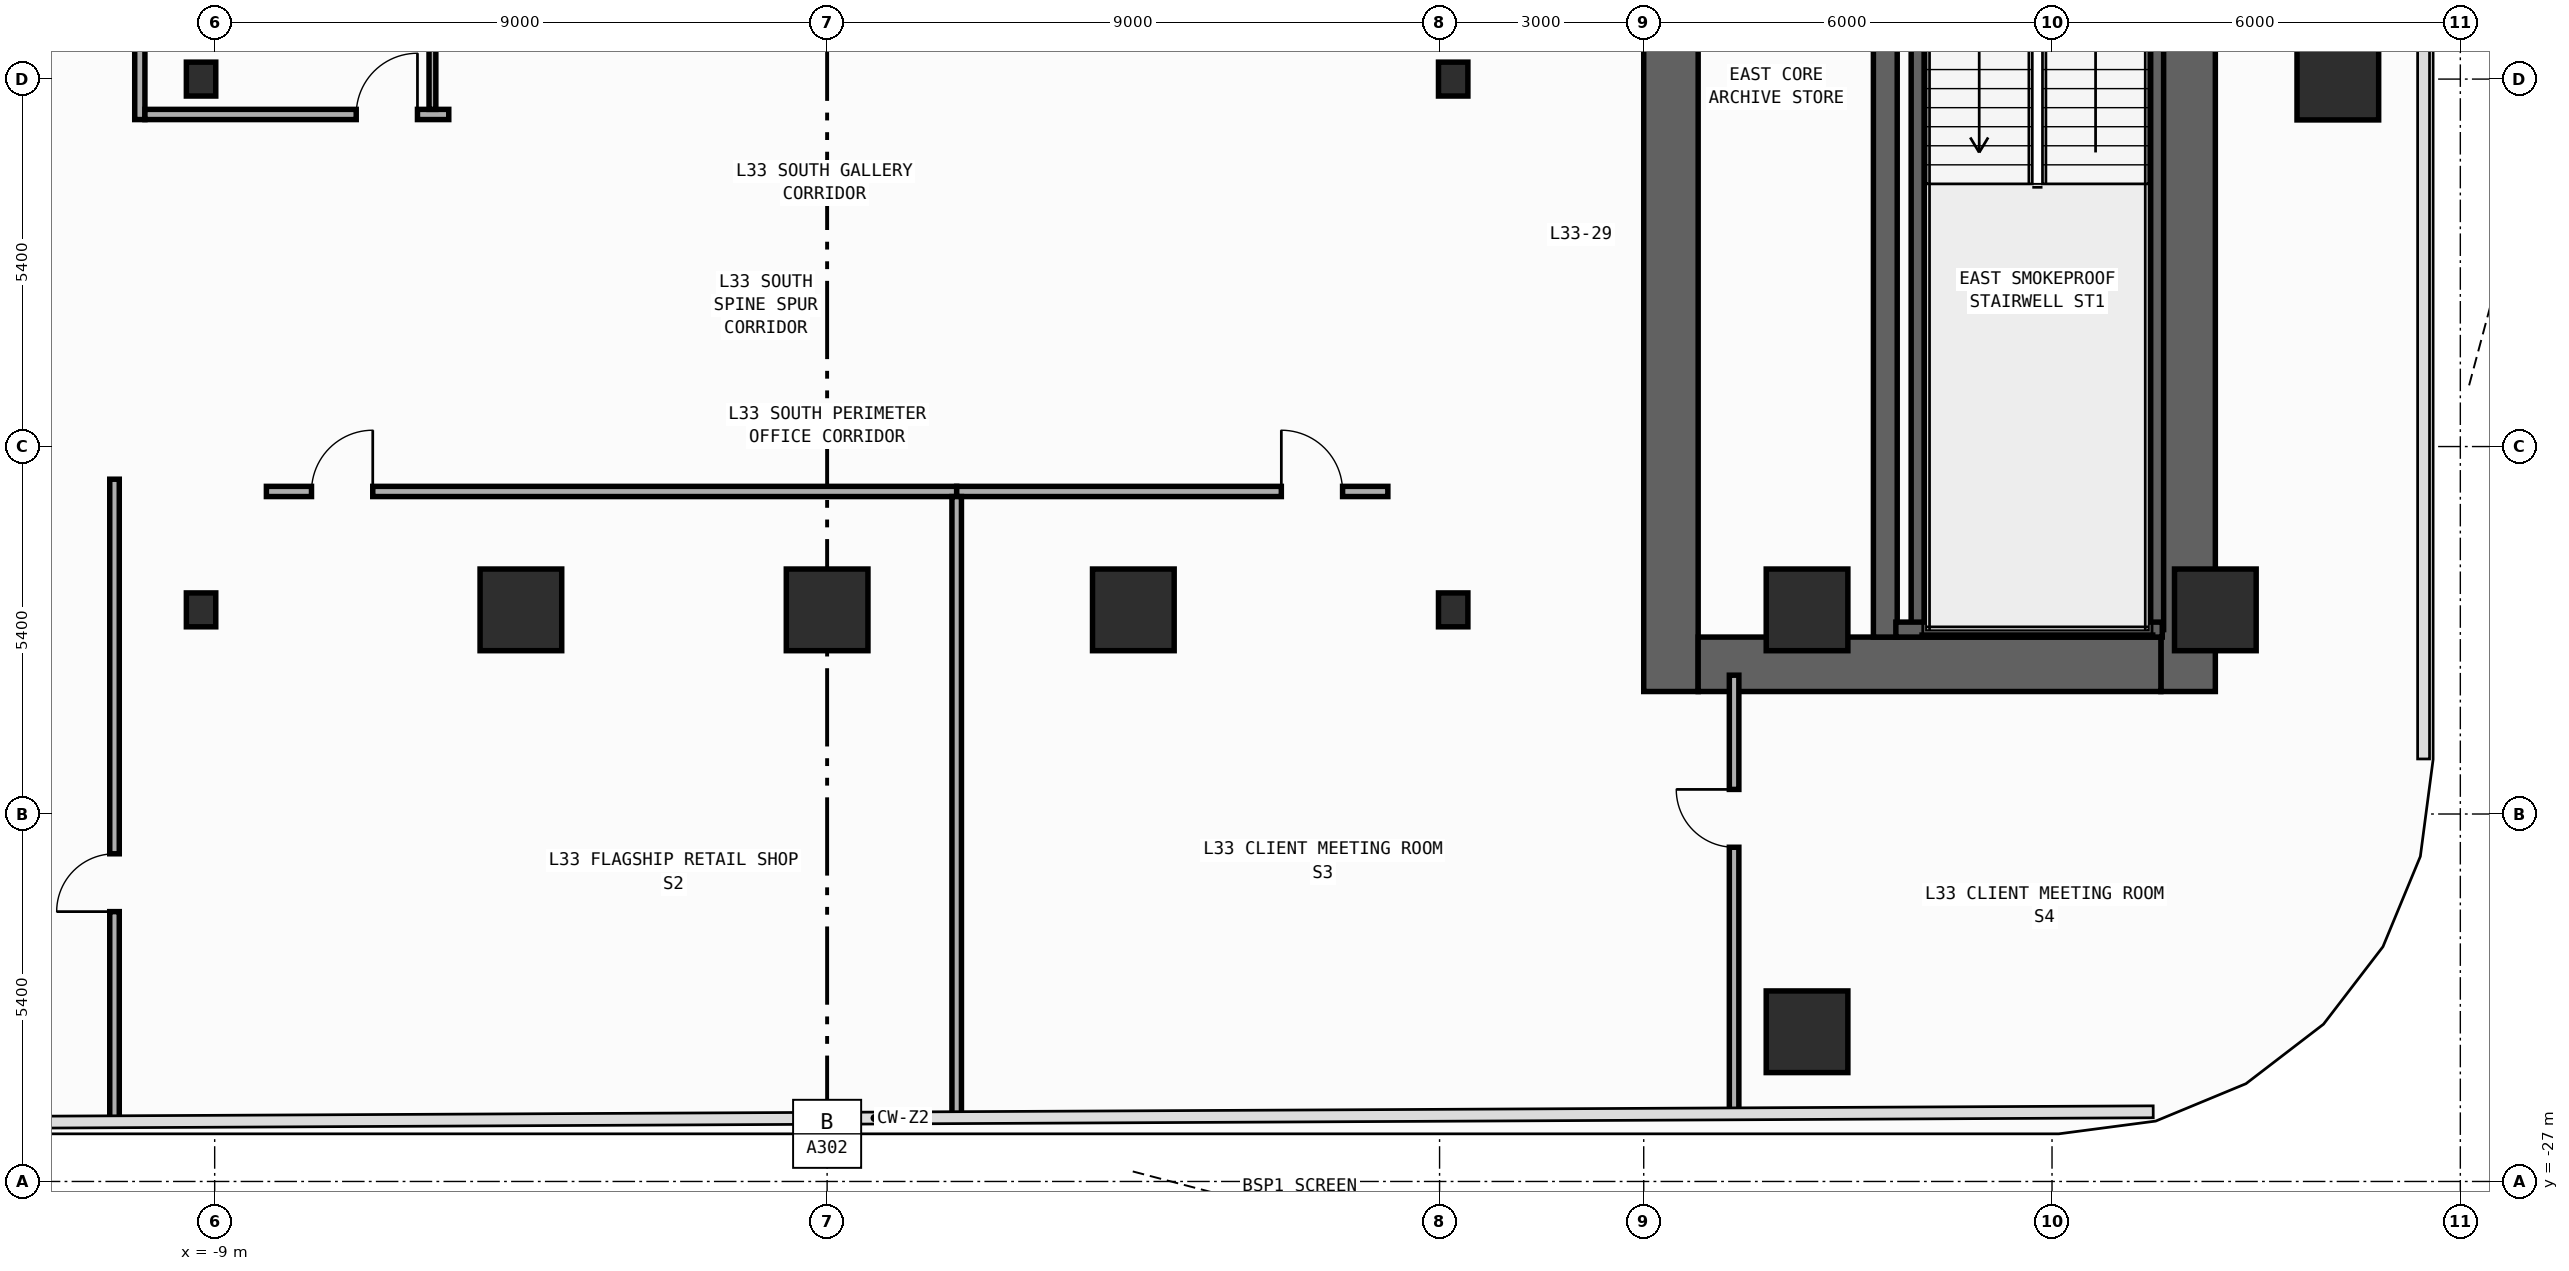
"""IFC4 building model, lengths in metres.
Left out: names, types, materials, properties, quantities, classifications, styles, units other than length and angle.
Written with IfcOpenShell. Run it as: python <this file> out.ifc"""

import sys

from ifc_helpers import new_model, si_unit, direction, frame, frame_2d, origin, origin_2d, place, context, subcontext, project, spatial, rectangle, i_section, extrude, element, fill, save


model = new_model("IFC4")
c1 = context("Model", 3, precision=1e-05, world=origin(), true_north=direction((0.0, 1.0)))
c2 = subcontext(c1, "Body", "Model", "MODEL_VIEW")
j1 = project(units=[si_unit("LENGTHUNIT", "METRE"), si_unit("PLANEANGLEUNIT", "RADIAN")], contexts=[c1])
p1 = place(None, origin())
s1 = spatial("IfcSite", under=j1, at=p1, CompositionType="ELEMENT")
p2 = place(p1, origin())
s2 = spatial("IfcBuilding", under=s1, at=p2, CompositionType="ELEMENT")
p3 = place(p2, frame((0.0, 0.0, 143.6)))
s3 = spatial("IfcBuildingStorey", under=s2, at=p3, CompositionType="ELEMENT", Elevation=143.6)
p4 = place(p3, frame((12.4, -19.8, 0.0), z_axis=(0.0, 0.0, 1.0), x_axis=(0.0, 1.0, 0.0)))
e1 = element("IfcWall", 1, at=p4, inside=s3, PredefinedType="SHEAR", context=c2, shape_type="SweptSolid", body=[
    extrude(rectangle(XDim=27.0, YDim=0.8, at=frame_2d((13.5, 0.0))), origin(), (0.0, 0.0, 1.0), 3.94),
])
p5 = place(p4, frame((23.05, 0.0, 0.0)))
e2 = element("IfcOpeningElement", 2, at=p5, cuts=e1, PredefinedType="OPENING", context=c2, shape_type="SweptSolid", body=[
    extrude(rectangle(XDim=1.1, YDim=2.2, at=frame_2d((0.55, 1.1))), frame((0.0, 0.41, 0.0), z_axis=(0.0, -1.0, 0.0), x_axis=(1.0, 0.0, 0.0)), (0.0, 0.0, 1.0), 0.82),
])
p6 = place(p4, frame((19.85, 0.0, 0.0)))
e3 = element("IfcOpeningElement", 3, at=p6, cuts=e1, PredefinedType="OPENING", context=c2, shape_type="SweptSolid", body=[
    extrude(rectangle(XDim=1.1, YDim=2.2, at=frame_2d((0.55, 1.1))), frame((0.0, 0.41, 0.0), z_axis=(0.0, -1.0, 0.0), x_axis=(1.0, 0.0, 0.0)), (0.0, 0.0, 1.0), 0.82),
])
p7 = place(p4, frame((16.65, 0.0, 0.0)))
e4 = element("IfcOpeningElement", 4, at=p7, cuts=e1, PredefinedType="OPENING", context=c2, shape_type="SweptSolid", body=[
    extrude(rectangle(XDim=1.1, YDim=2.2, at=frame_2d((0.55, 1.1))), frame((0.0, 0.41, 0.0), z_axis=(0.0, -1.0, 0.0), x_axis=(1.0, 0.0, 0.0)), (0.0, 0.0, 1.0), 0.82),
])
p8 = place(p4, frame((10.175, 0.0, 0.0)))
e5 = element("IfcOpeningElement", 5, at=p8, cuts=e1, PredefinedType="OPENING", context=c2, shape_type="SweptSolid", body=[
    extrude(rectangle(XDim=0.85, YDim=2.1, at=frame_2d((0.425, 1.05))), frame((0.0, 0.41, 0.0), z_axis=(0.0, -1.0, 0.0), x_axis=(1.0, 0.0, 0.0)), (0.0, 0.0, 1.0), 0.82),
])
p9 = place(p4, frame((12.725, 0.0, 0.0)))
e6 = element("IfcOpeningElement", 6, at=p9, cuts=e1, PredefinedType="OPENING", context=c2, shape_type="SweptSolid", body=[
    extrude(rectangle(XDim=1.15, YDim=2.2, at=frame_2d((0.575, 1.1))), frame((0.0, 0.41, 0.0), z_axis=(0.0, -1.0, 0.0), x_axis=(1.0, 0.0, 0.0)), (0.0, 0.0, 1.0), 0.82),
])
p10 = place(p4, frame((25.125, 0.0, 0.0)))
e7 = element("IfcOpeningElement", 7, at=p10, cuts=e1, PredefinedType="OPENING", context=c2, shape_type="SweptSolid", body=[
    extrude(rectangle(XDim=0.85, YDim=2.1, at=frame_2d((0.425, 1.05))), frame((0.0, 0.41, 0.0), z_axis=(0.0, -1.0, 0.0), x_axis=(1.0, 0.0, 0.0)), (0.0, 0.0, 1.0), 0.82),
])
p11 = place(p3, frame((20.0, -19.8, 0.0), z_axis=(0.0, 0.0, 1.0), x_axis=(0.0, 1.0, 0.0)))
e8 = element("IfcWall", 8, at=p11, inside=s3, PredefinedType="SHEAR", context=c2, shape_type="SweptSolid", body=[
    extrude(rectangle(XDim=27.0, YDim=0.8, at=frame_2d((13.5, 0.0))), origin(), (0.0, 0.0, 1.0), 3.94),
])
p12 = place(p3, frame((12.8, -19.4, 0.0), z_axis=(0.0, 0.0, 1.0), x_axis=(1.0, 0.0, 0.0)))
e9 = element("IfcWall", 9, at=p12, inside=s3, PredefinedType="SHEAR", context=c2, shape_type="SweptSolid", body=[
    extrude(rectangle(XDim=6.8, YDim=0.8, at=frame_2d((3.4, 0.0))), origin(), (0.0, 0.0, 1.0), 3.94),
])
p13 = place(p3, frame((15.55, -19.0, 0.0), z_axis=(0.0, 0.0, 1.0), x_axis=(0.0, 1.0, 0.0)))
e10 = element("IfcWall", 10, at=p13, inside=s3, PredefinedType="SHEAR", context=c2, shape_type="SweptSolid", body=[
    extrude(rectangle(XDim=25.4, YDim=0.35, at=frame_2d((12.7, 0.0))), origin(), (0.0, 0.0, 1.0), 3.94),
])
p14 = place(p13, frame((11.925, 0.0, 0.0)))
e11 = element("IfcOpeningElement", 11, at=p14, cuts=e10, PredefinedType="OPENING", context=c2, shape_type="SweptSolid", body=[
    extrude(rectangle(XDim=1.15, YDim=2.2, at=frame_2d((0.575, 1.1))), frame((0.0, 0.185, 0.0), z_axis=(0.0, -1.0, 0.0), x_axis=(1.0, 0.0, 0.0)), (0.0, 0.0, 1.0), 0.37),
])
p15 = place(p13, frame((24.325, 0.0, 0.0)))
e12 = element("IfcOpeningElement", 12, at=p15, cuts=e10, PredefinedType="OPENING", context=c2, shape_type="SweptSolid", body=[
    extrude(rectangle(XDim=0.85, YDim=2.1, at=frame_2d((0.425, 1.05))), frame((0.0, 0.185, 0.0), z_axis=(0.0, -1.0, 0.0), x_axis=(1.0, 0.0, 0.0)), (0.0, 0.0, 1.0), 0.37),
])
for number, where, z_axis, x_axis in (
    (13, (16.04, -18.89, 0.0), (0.0, 0.0, 1.0), (0.0, 1.0, 0.0)),
    (14, (19.53, -18.89, 0.0), (0.0, 0.0, 1.0), (0.0, 1.0, 0.0)),
):
    element("IfcWall", number, at=place(p3, frame(where, z_axis=z_axis, x_axis=x_axis)), inside=s3, PredefinedType="SHEAR", context=c2, shape_type="SweptSolid", body=[
        extrude(rectangle(XDim=11.3, YDim=0.22, at=frame_2d((5.65, 0.0))), origin(), (0.0, 0.0, 1.0), 3.94),
    ])
p16 = place(p3, frame((15.705, -18.89, 0.0), z_axis=(0.0, 0.0, 1.0), x_axis=(1.0, 0.0, 0.0)))
e15 = element("IfcWall", 15, at=p16, inside=s3, PredefinedType="SHEAR", context=c2, shape_type="SweptSolid", body=[
    extrude(rectangle(XDim=3.915, YDim=0.22, at=frame_2d((1.958, 0.0))), origin(), (0.0, 0.0, 1.0), 3.94),
])
for number, where, z_axis, x_axis in (
    (16, (-9.2, -18.6, 0.0), (0.0, 0.0, 1.0), (1.0, 0.0, 0.0)),
    (17, (-9.2, -10.8, 0.0), (0.0, 0.0, 1.0), (1.0, 0.0, 0.0)),
    (18, (9.2, -18.6, 0.0), (0.0, 0.0, 1.0), (1.0, 0.0, 0.0)),
    (19, (9.2, -10.8, 0.0), (0.0, 0.0, 1.0), (1.0, 0.0, 0.0)),
):
    element("IfcColumn", number, at=place(p3, frame(where, z_axis=z_axis, x_axis=x_axis)), inside=s3, PredefinedType="COLUMN", context=c2, shape_type="SweptSolid", body=[
        extrude(i_section(OverallWidth=0.432, OverallDepth=0.498, WebThickness=0.045, FlangeThickness=0.07, FilletRadius=0.022, at=origin_2d()), origin(), (0.0, 0.0, 1.0), 4.2),
    ])
for number, where, z_axis, x_axis in (
    (20, (20.4, -18.6, 0.0), (0.0, 0.0, 1.0), (1.0, 0.0, 0.0)),
    (21, (14.4, -18.6, 0.0), (0.0, 0.0, 1.0), (1.0, 0.0, 0.0)),
    (22, (-4.5, -18.6, 0.0), (0.0, 0.0, 1.0), (1.0, 0.0, 0.0)),
    (23, (0.0, -18.6, 0.0), (0.0, 0.0, 1.0), (1.0, 0.0, 0.0)),
    (24, (4.5, -18.6, 0.0), (0.0, 0.0, 1.0), (1.0, 0.0, 0.0)),
    (25, (22.2, -10.8, 0.0), (0.0, 0.0, 1.0), (1.0, 0.0, 0.0)),
    (26, (14.4, -24.8, 0.0), (0.0, 0.0, 1.0), (1.0, 0.0, 0.0)),
):
    element("IfcColumn", number, at=place(p3, frame(where, z_axis=z_axis, x_axis=x_axis)), inside=s3, PredefinedType="COLUMN", context=c2, shape_type="SweptSolid", body=[
        extrude(rectangle(XDim=1.2, YDim=1.2, at=origin_2d()), origin(), (0.0, 0.0, 1.0), 4.2),
    ])
p17 = place(p3, frame((-10.1, -11.395, 0.0), z_axis=(0.0, 0.0, 1.0), x_axis=(0.0, 1.0, 0.0)))
e27 = element("IfcWall", 27, at=p17, inside=s3, PredefinedType="PARTITIONING", context=c2, shape_type="SweptSolid", body=[
    extrude(rectangle(XDim=4.275, YDim=0.15, at=frame_2d((2.137, 0.0))), origin(), (0.0, 0.0, 1.0), 3.94),
])
p18 = place(p17, frame((2.915, 0.0, 0.0)))
e28 = element("IfcOpeningElement", 28, at=p18, cuts=e27, PredefinedType="OPENING", context=c2, shape_type="SweptSolid", body=[
    extrude(rectangle(XDim=0.9, YDim=2.15, at=frame_2d((0.45, 1.075))), frame((0.0, 0.085, 0.0), z_axis=(0.0, -1.0, 0.0), x_axis=(1.0, 0.0, 0.0)), (0.0, 0.0, 1.0), 0.17),
])
p19 = place(p3, frame((-10.025, -11.32, 0.0), z_axis=(0.0, 0.0, 1.0), x_axis=(1.0, 0.0, 0.0)))
e29 = element("IfcWall", 29, at=p19, inside=s3, PredefinedType="PARTITIONING", context=c2, shape_type="SweptSolid", body=[
    extrude(rectangle(XDim=4.465, YDim=0.15, at=frame_2d((2.232, 0.0))), origin(), (0.0, 0.0, 1.0), 3.94),
])
p20 = place(p19, frame((3.105, 0.0, 0.0)))
e30 = element("IfcOpeningElement", 30, at=p20, cuts=e29, PredefinedType="OPENING", context=c2, shape_type="SweptSolid", body=[
    extrude(rectangle(XDim=0.9, YDim=2.15, at=frame_2d((0.45, 1.075))), frame((0.0, 0.085, 0.0), z_axis=(0.0, -1.0, 0.0), x_axis=(1.0, 0.0, 0.0)), (0.0, 0.0, 1.0), 0.17),
])
p21 = place(p3, frame((-8.24, -16.86, 0.0), z_axis=(0.0, 0.0, 1.0), x_axis=(1.0, 0.0, 0.0)))
e31 = element("IfcWall", 31, at=p21, inside=s3, PredefinedType="PARTITIONING", context=c2, shape_type="SweptSolid", body=[
    extrude(rectangle(XDim=10.144, YDim=0.15, at=frame_2d((5.072, 0.0))), origin(), (0.0, 0.0, 1.0), 3.94),
])
p22 = place(p21, frame((0.663, 0.0, 0.0)))
e32 = element("IfcOpeningElement", 32, at=p22, cuts=e31, PredefinedType="OPENING", context=c2, shape_type="SweptSolid", body=[
    extrude(rectangle(XDim=0.9, YDim=2.15, at=frame_2d((0.45, 1.075))), frame((0.0, 0.085, 0.0), z_axis=(0.0, -1.0, 0.0), x_axis=(1.0, 0.0, 0.0)), (0.0, 0.0, 1.0), 0.17),
])
p23 = place(p3, frame((1.904, -16.86, 0.0), z_axis=(0.0, 0.0, 1.0), x_axis=(1.0, 0.0, 0.0)))
e33 = element("IfcWall", 33, at=p23, inside=s3, PredefinedType="PARTITIONING", context=c2, shape_type="SweptSolid", body=[
    extrude(rectangle(XDim=6.336, YDim=0.15, at=frame_2d((3.168, 0.0))), origin(), (0.0, 0.0, 1.0), 3.94),
])
p24 = place(p23, frame((4.771, 0.0, 0.0)))
e34 = element("IfcOpeningElement", 34, at=p24, cuts=e33, PredefinedType="OPENING", context=c2, shape_type="SweptSolid", body=[
    extrude(rectangle(XDim=0.9, YDim=2.15, at=frame_2d((0.45, 1.075))), frame((0.0, 0.085, 0.0), z_axis=(0.0, -1.0, 0.0), x_axis=(1.0, 0.0, 0.0)), (0.0, 0.0, 1.0), 0.17),
])
p25 = place(p3, frame((-10.472, -26.118, 0.0), z_axis=(0.0, 0.0, 1.0), x_axis=(0.0, 1.0, 0.0)))
e35 = element("IfcWall", 35, at=p25, inside=s3, PredefinedType="PARTITIONING", context=c2, shape_type="SweptSolid", body=[
    extrude(rectangle(XDim=9.438, YDim=0.14, at=frame_2d((4.719, 0.0))), origin(), (0.0, 0.0, 1.0), 3.94),
])
p26 = place(p25, frame((3.083, 0.0, 0.0)))
e36 = element("IfcOpeningElement", 36, at=p26, cuts=e35, PredefinedType="OPENING", context=c2, shape_type="SweptSolid", body=[
    extrude(rectangle(XDim=0.85, YDim=2.1, at=frame_2d((0.425, 1.05))), frame((0.0, 0.08, 0.0), z_axis=(0.0, -1.0, 0.0), x_axis=(1.0, 0.0, 0.0)), (0.0, 0.0, 1.0), 0.16),
])
p27 = place(p3, frame((1.904, -26.057, 0.0), z_axis=(0.0, 0.0, 1.0), x_axis=(0.0, 1.0, 0.0)))
e37 = element("IfcWall", 37, at=p27, inside=s3, PredefinedType="PARTITIONING", context=c2, shape_type="SweptSolid", body=[
    extrude(rectangle(XDim=9.122, YDim=0.14, at=frame_2d((4.561, 0.0))), origin(), (0.0, 0.0, 1.0), 3.94),
])
p28 = place(p3, frame((13.328, -26.001, 0.0), z_axis=(0.0, 0.0, 1.0), x_axis=(0.0, 1.0, 0.0)))
e38 = element("IfcWall", 38, at=p28, inside=s3, PredefinedType="PARTITIONING", context=c2, shape_type="SweptSolid", body=[
    extrude(rectangle(XDim=6.441, YDim=0.14, at=frame_2d((3.221, 0.0))), origin(), (0.0, 0.0, 1.0), 3.94),
])
p29 = place(p28, frame((3.913, 0.0, 0.0)))
e39 = element("IfcOpeningElement", 39, at=p29, cuts=e38, PredefinedType="OPENING", context=c2, shape_type="SweptSolid", body=[
    extrude(rectangle(XDim=0.85, YDim=2.1, at=frame_2d((0.425, 1.05))), frame((0.0, 0.08, 0.0), z_axis=(0.0, -1.0, 0.0), x_axis=(1.0, 0.0, 0.0)), (0.0, 0.0, 1.0), 0.16),
])
p30 = place(p3, frame((-5.8, -7.19, 0.0), z_axis=(0.0, 0.0, 1.0), x_axis=(0.0, -1.0, 0.0)))
e40 = element("IfcWall", 40, at=p30, inside=s3, PredefinedType="PARTITIONING", context=c2, shape_type="SweptSolid", body=[
    extrude(rectangle(XDim=4.055, YDim=0.1, at=frame_2d((2.028, 0.0))), origin(), (0.0, 0.0, 1.0), 3.94),
])
p31 = place(p20, origin())
e41 = element("IfcDoor", 41, at=p31, inside=s3, OperationType="SINGLE_SWING_RIGHT", PredefinedType="DOOR", context=c2, shape_type="SweptSolid", body=[
    extrude(rectangle(XDim=0.9, YDim=2.15, at=frame_2d((0.45, 1.075))), frame((0.0, 0.025, 0.0), z_axis=(0.0, -1.0, 0.0), x_axis=(1.0, 0.0, 0.0)), (0.0, 0.0, 1.0), 0.05),
])
fill(e30, e41)
p32 = place(p22, origin())
e42 = element("IfcDoor", 42, at=p32, inside=s3, OperationType="SINGLE_SWING_RIGHT", PredefinedType="DOOR", context=c2, shape_type="SweptSolid", body=[
    extrude(rectangle(XDim=0.9, YDim=2.15, at=frame_2d((0.45, 1.075))), frame((0.0, 0.025, 0.0), z_axis=(0.0, -1.0, 0.0), x_axis=(1.0, 0.0, 0.0)), (0.0, 0.0, 1.0), 0.05),
])
fill(e32, e42)
p33 = place(p24, origin())
e43 = element("IfcDoor", 43, at=p33, inside=s3, OperationType="SINGLE_SWING_LEFT", PredefinedType="DOOR", context=c2, shape_type="SweptSolid", body=[
    extrude(rectangle(XDim=0.9, YDim=2.15, at=frame_2d((0.45, 1.075))), frame((0.0, 0.025, 0.0), z_axis=(0.0, -1.0, 0.0), x_axis=(1.0, 0.0, 0.0)), (0.0, 0.0, 1.0), 0.05),
])
fill(e34, e43)
p34 = place(p26, origin())
e44 = element("IfcDoor", 44, at=p34, inside=s3, OperationType="SINGLE_SWING_LEFT", PredefinedType="DOOR", context=c2, shape_type="SweptSolid", body=[
    extrude(rectangle(XDim=0.85, YDim=2.1, at=frame_2d((0.425, 1.05))), frame((0.0, 0.025, 0.0), z_axis=(0.0, -1.0, 0.0), x_axis=(1.0, 0.0, 0.0)), (0.0, 0.0, 1.0), 0.05),
])
fill(e36, e44)
p35 = place(p29, origin())
e45 = element("IfcDoor", 45, at=p35, inside=s3, OperationType="SINGLE_SWING_RIGHT", PredefinedType="DOOR", context=c2, shape_type="SweptSolid", body=[
    extrude(rectangle(XDim=0.85, YDim=2.1, at=frame_2d((0.425, 1.05))), frame((0.0, 0.025, 0.0), z_axis=(0.0, -1.0, 0.0), x_axis=(1.0, 0.0, 0.0)), (0.0, 0.0, 1.0), 0.05),
])
fill(e39, e45)
save(model, sys.argv[1])
